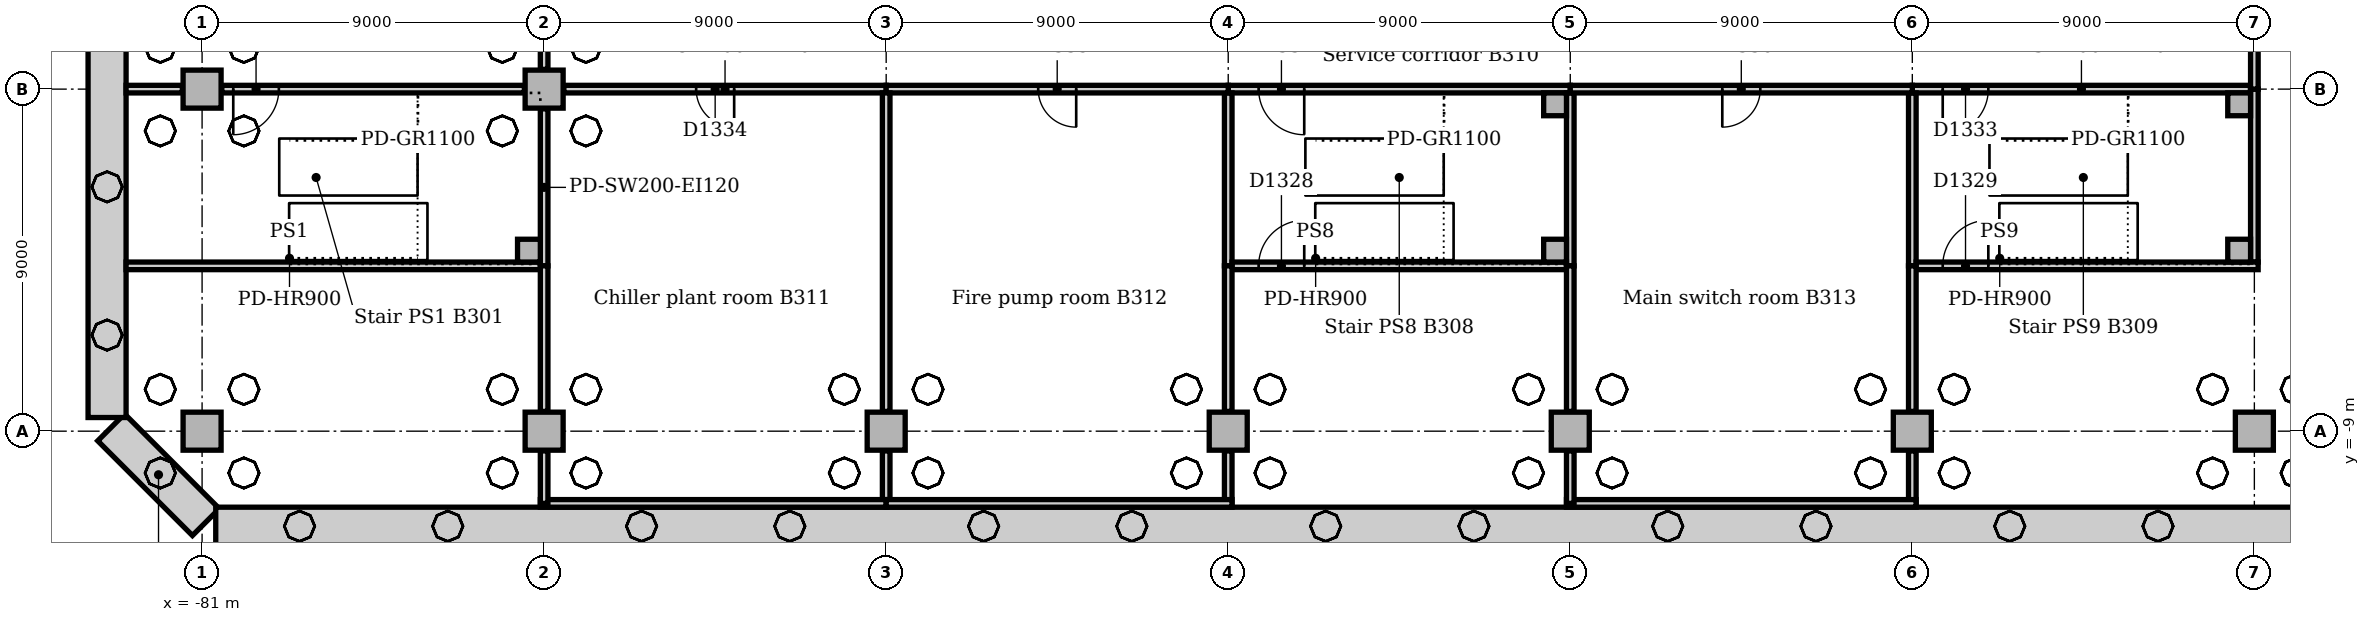
"""IFC4 building model, lengths in metres.
Left out: names, types, materials, properties, quantities, classifications, styles, units other than length and angle.
Written with IfcOpenShell. Run it as: python <this file> out.ifc"""

import sys

from ifc_helpers import new_model, si_unit, direction, frame, frame_2d, origin, origin_2d, place, context, subcontext, project, spatial, rectangle, extrude, element, fill, save


model = new_model("IFC4")
c1 = context("Model", 3, precision=1e-05, world=origin(), true_north=direction((0.0, 1.0)))
c2 = subcontext(c1, "Body", "Model", "MODEL_VIEW")
j1 = project(units=[si_unit("LENGTHUNIT", "METRE"), si_unit("PLANEANGLEUNIT", "RADIAN")], contexts=[c1])
p1 = place(None, origin())
s1 = spatial("IfcSite", under=j1, at=p1, CompositionType="ELEMENT")
p2 = place(p1, origin())
s2 = spatial("IfcBuilding", under=s1, at=p2, CompositionType="ELEMENT")
p3 = place(p2, frame((0.0, 0.0, -14.0)))
s3 = spatial("IfcBuildingStorey", under=s2, at=p3, CompositionType="ELEMENT", Elevation=-14.0)
p4 = place(p3, frame((-80.9, -11.392, 0.0), z_axis=(0.0, 0.0, 1.0), x_axis=(-0.707106781187, 0.707106781187, 0.0)))
e1 = element("IfcWall", 1, at=p4, inside=s3, PredefinedType="SOLIDWALL", context=c2, shape_type="SweptSolid", body=[
    extrude(rectangle(XDim=3.524, YDim=1.0, at=frame_2d((1.762, 0.0))), origin(), (0.0, 0.0, 1.0), 4.5),
])
p5 = place(p3, frame((-83.5, -8.641, 0.0), z_axis=(0.0, 0.0, 1.0), x_axis=(0.0, 1.0, 0.0)))
e2 = element("IfcWall", 2, at=p5, inside=s3, PredefinedType="SOLIDWALL", context=c2, shape_type="SweptSolid", body=[
    extrude(rectangle(XDim=62.282, YDim=1.0, at=frame_2d((31.141, 0.0))), origin(), (0.0, 0.0, 1.0), 4.5),
])
p6 = place(p3, frame((62.641, -11.5, 0.0), z_axis=(0.0, 0.0, 1.0), x_axis=(-1.0, 0.0, 0.0)))
e3 = element("IfcWall", 3, at=p6, inside=s3, PredefinedType="SOLIDWALL", context=c2, shape_type="SweptSolid", body=[
    extrude(rectangle(XDim=143.282, YDim=1.0, at=frame_2d((71.641, 0.0))), origin(), (0.0, 0.0, 1.0), 4.5),
])
for number, where, z_axis, x_axis in (
    (4, (-81.0, -9.0, 0.0), (0.0, 0.0, 1.0), (1.0, 0.0, 0.0)),
    (5, (-81.0, 0.0, 0.0), (0.0, 0.0, 1.0), (1.0, 0.0, 0.0)),
    (6, (-72.0, -9.0, 0.0), (0.0, 0.0, 1.0), (1.0, 0.0, 0.0)),
    (7, (-72.0, 0.0, 0.0), (0.0, 0.0, 1.0), (1.0, 0.0, 0.0)),
    (8, (-63.0, -9.0, 0.0), (0.0, 0.0, 1.0), (1.0, 0.0, 0.0)),
    (9, (-54.0, -9.0, 0.0), (0.0, 0.0, 1.0), (1.0, 0.0, 0.0)),
    (10, (-45.0, -9.0, 0.0), (0.0, 0.0, 1.0), (1.0, 0.0, 0.0)),
    (11, (-36.0, -9.0, 0.0), (0.0, 0.0, 1.0), (1.0, 0.0, 0.0)),
    (12, (-27.0, -9.0, 0.0), (0.0, 0.0, 1.0), (1.0, 0.0, 0.0)),
):
    element("IfcColumn", number, at=place(p3, frame(where, z_axis=z_axis, x_axis=x_axis)), inside=s3, PredefinedType="COLUMN", context=c2, shape_type="SweptSolid", body=[
        extrude(rectangle(XDim=1.0, YDim=1.0, at=origin_2d()), origin(), (0.0, 0.0, 1.0), 4.15),
    ])
for number, where, z_axis, x_axis in (
    (13, (-72.4, -4.25, 0.0), (0.0, 0.0, 1.0), (1.0, 0.0, 0.0)),
    (14, (-45.4, -4.25, 0.0), (0.0, 0.0, 1.0), (1.0, 0.0, 0.0)),
    (15, (-45.4, -0.4, 0.0), (0.0, 0.0, 1.0), (1.0, 0.0, 0.0)),
    (16, (-27.4, -4.25, 0.0), (0.0, 0.0, 1.0), (1.0, 0.0, 0.0)),
    (17, (-27.4, -0.4, 0.0), (0.0, 0.0, 1.0), (1.0, 0.0, 0.0)),
):
    element("IfcColumn", number, at=place(p3, frame(where, z_axis=z_axis, x_axis=x_axis)), inside=s3, PredefinedType="COLUMN", context=c2, shape_type="SweptSolid", body=[
        extrude(rectangle(XDim=0.6, YDim=0.6, at=origin_2d()), origin(), (0.0, 0.0, 1.0), 4.5),
    ])
p7 = place(p3, frame((-72.0, -4.65, 0.0), z_axis=(0.0, 0.0, 1.0), x_axis=(0.0, 1.0, 0.0)))
e18 = element("IfcWall", 18, at=p7, inside=s3, PredefinedType="SOLIDWALL", context=c2, shape_type="SweptSolid", body=[
    extrude(rectangle(XDim=4.13, YDim=0.2, at=frame_2d((2.065, 0.0))), origin(), (0.0, 0.0, 1.0), 4.15),
])
p8 = place(p3, frame((-83.0, -4.65, 0.0), z_axis=(0.0, 0.0, 1.0), x_axis=(1.0, 0.0, 0.0)))
e19 = element("IfcWall", 19, at=p8, inside=s3, PredefinedType="SOLIDWALL", context=c2, shape_type="SweptSolid", body=[
    extrude(rectangle(XDim=10.9, YDim=0.2, at=frame_2d((5.45, 0.0))), origin(), (0.0, 0.0, 1.0), 4.15),
])
p9 = place(p3, frame((-83.0, 0.0, 0.0), z_axis=(0.0, 0.0, 1.0), x_axis=(1.0, 0.0, 0.0)))
e20 = element("IfcWall", 20, at=p9, inside=s3, PredefinedType="SOLIDWALL", context=c2, shape_type="SweptSolid", body=[
    extrude(rectangle(XDim=1.48, YDim=0.2, at=frame_2d((0.74, 0.0))), origin(), (0.0, 0.0, 1.0), 4.15),
])
p10 = place(p3, frame((-80.48, 0.0, 0.0), z_axis=(0.0, 0.0, 1.0), x_axis=(1.0, 0.0, 0.0)))
e21 = element("IfcWall", 21, at=p10, inside=s3, PredefinedType="SOLIDWALL", context=c2, shape_type="SweptSolid", body=[
    extrude(rectangle(XDim=7.96, YDim=0.2, at=frame_2d((3.98, 0.0))), origin(), (0.0, 0.0, 1.0), 4.15),
])
p11 = place(p10, frame((0.3, 0.0, 0.0)))
e22 = element("IfcOpeningElement", 22, at=p11, cuts=e21, PredefinedType="OPENING", context=c2, shape_type="SweptSolid", body=[
    extrude(rectangle(XDim=1.2, YDim=2.1, at=frame_2d((0.6, 1.05))), frame((0.0, 0.11, 0.0), z_axis=(0.0, -1.0, 0.0), x_axis=(1.0, 0.0, 0.0)), (0.0, 0.0, 1.0), 0.22),
])
p12 = place(p3, frame((-54.0, 0.0, 0.0), z_axis=(0.0, 0.0, 1.0), x_axis=(1.0, 0.0, 0.0)))
e23 = element("IfcWall", 23, at=p12, inside=s3, PredefinedType="SOLIDWALL", context=c2, shape_type="SweptSolid", body=[
    extrude(rectangle(XDim=9.0, YDim=0.2, at=frame_2d((4.5, 0.0))), origin(), (0.0, 0.0, 1.0), 4.15),
])
p13 = place(p12, frame((0.8, 0.0, 0.0)))
e24 = element("IfcOpeningElement", 24, at=p13, cuts=e23, PredefinedType="OPENING", context=c2, shape_type="SweptSolid", body=[
    extrude(rectangle(XDim=1.2, YDim=2.1, at=frame_2d((0.6, 1.05))), frame((0.0, 0.11, 0.0), z_axis=(0.0, -1.0, 0.0), x_axis=(1.0, 0.0, 0.0)), (0.0, 0.0, 1.0), 0.22),
])
for number, where, z_axis, x_axis in (
    (25, (-54.0, -4.65, 0.0), (0.0, 0.0, 1.0), (0.0, 1.0, 0.0)),
    (26, (-45.0, -4.65, 0.0), (0.0, 0.0, 1.0), (0.0, 1.0, 0.0)),
):
    element("IfcWall", number, at=place(p3, frame(where, z_axis=z_axis, x_axis=x_axis)), inside=s3, PredefinedType="SOLIDWALL", context=c2, shape_type="SweptSolid", body=[
        extrude(rectangle(XDim=4.55, YDim=0.2, at=frame_2d((2.275, 0.0))), origin(), (0.0, 0.0, 1.0), 4.15),
    ])
p14 = place(p3, frame((-53.9, -4.65, 0.0), z_axis=(0.0, 0.0, 1.0), x_axis=(1.0, 0.0, 0.0)))
e27 = element("IfcWall", 27, at=p14, inside=s3, PredefinedType="SOLIDWALL", context=c2, shape_type="SweptSolid", body=[
    extrude(rectangle(XDim=8.8, YDim=0.2, at=frame_2d((4.4, 0.0))), origin(), (0.0, 0.0, 1.0), 4.15),
])
p15 = place(p14, frame((0.7, 0.0, 0.0)))
e28 = element("IfcOpeningElement", 28, at=p15, cuts=e27, PredefinedType="OPENING", context=c2, shape_type="SweptSolid", body=[
    extrude(rectangle(XDim=1.2, YDim=2.1, at=frame_2d((0.6, 1.05))), frame((0.0, 0.11, 0.0), z_axis=(0.0, -1.0, 0.0), x_axis=(1.0, 0.0, 0.0)), (0.0, 0.0, 1.0), 0.22),
])
p16 = place(p3, frame((-36.0, 0.0, 0.0), z_axis=(0.0, 0.0, 1.0), x_axis=(1.0, 0.0, 0.0)))
e29 = element("IfcWall", 29, at=p16, inside=s3, PredefinedType="SOLIDWALL", context=c2, shape_type="SweptSolid", body=[
    extrude(rectangle(XDim=8.9, YDim=0.2, at=frame_2d((4.45, 0.0))), origin(), (0.0, 0.0, 1.0), 4.15),
])
p17 = place(p16, frame((0.8, 0.0, 0.0)))
e30 = element("IfcOpeningElement", 30, at=p17, cuts=e29, PredefinedType="OPENING", context=c2, shape_type="SweptSolid", body=[
    extrude(rectangle(XDim=1.2, YDim=2.1, at=frame_2d((0.6, 1.05))), frame((0.0, 0.11, 0.0), z_axis=(0.0, -1.0, 0.0), x_axis=(1.0, 0.0, 0.0)), (0.0, 0.0, 1.0), 0.22),
])
for number, where, z_axis, x_axis in (
    (31, (-36.0, -4.65, 0.0), (0.0, 0.0, 1.0), (0.0, 1.0, 0.0)),
    (32, (-27.0, -4.55, 0.0), (0.0, 0.0, 1.0), (0.0, 1.0, 0.0)),
):
    element("IfcWall", number, at=place(p3, frame(where, z_axis=z_axis, x_axis=x_axis)), inside=s3, PredefinedType="SOLIDWALL", context=c2, shape_type="SweptSolid", body=[
        extrude(rectangle(XDim=4.55, YDim=0.2, at=frame_2d((2.275, 0.0))), origin(), (0.0, 0.0, 1.0), 4.15),
    ])
p18 = place(p3, frame((-35.9, -4.65, 0.0), z_axis=(0.0, 0.0, 1.0), x_axis=(1.0, 0.0, 0.0)))
e33 = element("IfcWall", 33, at=p18, inside=s3, PredefinedType="SOLIDWALL", context=c2, shape_type="SweptSolid", body=[
    extrude(rectangle(XDim=9.0, YDim=0.2, at=frame_2d((4.5, 0.0))), origin(), (0.0, 0.0, 1.0), 4.15),
])
p19 = place(p18, frame((0.7, 0.0, 0.0)))
e34 = element("IfcOpeningElement", 34, at=p19, cuts=e33, PredefinedType="OPENING", context=c2, shape_type="SweptSolid", body=[
    extrude(rectangle(XDim=1.2, YDim=2.1, at=frame_2d((0.6, 1.05))), frame((0.0, 0.11, 0.0), z_axis=(0.0, -1.0, 0.0), x_axis=(1.0, 0.0, 0.0)), (0.0, 0.0, 1.0), 0.22),
])
p20 = place(p3, frame((-71.48, 0.0, 0.0), z_axis=(0.0, 0.0, 1.0), x_axis=(1.0, 0.0, 0.0)))
e35 = element("IfcWall", 35, at=p20, inside=s3, PredefinedType="PARTITIONING", context=c2, shape_type="SweptSolid", body=[
    extrude(rectangle(XDim=8.48, YDim=0.2, at=frame_2d((4.24, 0.0))), origin(), (0.0, 0.0, 1.0), 4.15),
])
p21 = place(p20, frame((3.48, 0.0, 0.0)))
e36 = element("IfcOpeningElement", 36, at=p21, cuts=e35, PredefinedType="OPENING", context=c2, shape_type="SweptSolid", body=[
    extrude(rectangle(XDim=1.0, YDim=2.1, at=frame_2d((0.5, 1.05))), frame((0.0, 0.11, 0.0), z_axis=(0.0, -1.0, 0.0), x_axis=(1.0, 0.0, 0.0)), (0.0, 0.0, 1.0), 0.22),
])
p22 = place(p3, frame((-63.0, 0.0, 0.0), z_axis=(0.0, 0.0, 1.0), x_axis=(1.0, 0.0, 0.0)))
e37 = element("IfcWall", 37, at=p22, inside=s3, PredefinedType="PARTITIONING", context=c2, shape_type="SweptSolid", body=[
    extrude(rectangle(XDim=9.0, YDim=0.2, at=frame_2d((4.5, 0.0))), origin(), (0.0, 0.0, 1.0), 4.15),
])
p23 = place(p22, frame((4.0, 0.0, 0.0)))
e38 = element("IfcOpeningElement", 38, at=p23, cuts=e37, PredefinedType="OPENING", context=c2, shape_type="SweptSolid", body=[
    extrude(rectangle(XDim=1.0, YDim=2.1, at=frame_2d((0.5, 1.05))), frame((0.0, 0.11, 0.0), z_axis=(0.0, -1.0, 0.0), x_axis=(1.0, 0.0, 0.0)), (0.0, 0.0, 1.0), 0.22),
])
p24 = place(p3, frame((-45.0, 0.0, 0.0), z_axis=(0.0, 0.0, 1.0), x_axis=(1.0, 0.0, 0.0)))
e39 = element("IfcWall", 39, at=p24, inside=s3, PredefinedType="PARTITIONING", context=c2, shape_type="SweptSolid", body=[
    extrude(rectangle(XDim=9.0, YDim=0.2, at=frame_2d((4.5, 0.0))), origin(), (0.0, 0.0, 1.0), 4.15),
])
p25 = place(p24, frame((4.0, 0.0, 0.0)))
e40 = element("IfcOpeningElement", 40, at=p25, cuts=e39, PredefinedType="OPENING", context=c2, shape_type="SweptSolid", body=[
    extrude(rectangle(XDim=1.0, YDim=2.1, at=frame_2d((0.5, 1.05))), frame((0.0, 0.11, 0.0), z_axis=(0.0, -1.0, 0.0), x_axis=(1.0, 0.0, 0.0)), (0.0, 0.0, 1.0), 0.22),
])
p26 = place(p3, frame((-27.0, 0.0, 0.0), z_axis=(0.0, 0.0, 1.0), x_axis=(0.0, 1.0, 0.0)))
e41 = element("IfcWall", 41, at=p26, inside=s3, PredefinedType="PARTITIONING", context=c2, shape_type="SweptSolid", body=[
    extrude(rectangle(XDim=3.5, YDim=0.2, at=frame_2d((1.75, 0.0))), origin(), (0.0, 0.0, 1.0), 4.15),
])
p27 = place(p3, frame((-72.0, 0.52, 0.0), z_axis=(0.0, 0.0, 1.0), x_axis=(0.0, 1.0, 0.0)))
e42 = element("IfcWall", 42, at=p27, inside=s3, PredefinedType="PARTITIONING", context=c2, shape_type="SweptSolid", body=[
    extrude(rectangle(XDim=3.08, YDim=0.2, at=frame_2d((1.54, 0.0))), origin(), (0.0, 0.0, 1.0), 4.15),
])
p28 = place(p3, frame((-63.0, -10.9, 0.0), z_axis=(0.0, 0.0, 1.0), x_axis=(0.0, 1.0, 0.0)))
e43 = element("IfcWall", 43, at=p28, inside=s3, PredefinedType="PARTITIONING", context=c2, shape_type="SweptSolid", body=[
    extrude(rectangle(XDim=1.38, YDim=0.2, at=frame_2d((0.69, 0.0))), origin(), (0.0, 0.0, 1.0), 4.15),
])
p29 = place(p3, frame((-63.0, -8.48, 0.0), z_axis=(0.0, 0.0, 1.0), x_axis=(0.0, 1.0, 0.0)))
e44 = element("IfcWall", 44, at=p29, inside=s3, PredefinedType="PARTITIONING", context=c2, shape_type="SweptSolid", body=[
    extrude(rectangle(XDim=8.38, YDim=0.2, at=frame_2d((4.19, 0.0))), origin(), (0.0, 0.0, 1.0), 4.15),
])
p30 = place(p3, frame((-72.1, -10.9, 0.0), z_axis=(0.0, 0.0, 1.0), x_axis=(1.0, 0.0, 0.0)))
e45 = element("IfcWall", 45, at=p30, inside=s3, PredefinedType="PARTITIONING", context=c2, shape_type="SweptSolid", body=[
    extrude(rectangle(XDim=9.1, YDim=0.2, at=frame_2d((4.55, 0.0))), origin(), (0.0, 0.0, 1.0), 4.15),
])
p31 = place(p3, frame((-72.0, -10.9, 0.0), z_axis=(0.0, 0.0, 1.0), x_axis=(0.0, 1.0, 0.0)))
e46 = element("IfcWall", 46, at=p31, inside=s3, PredefinedType="PARTITIONING", context=c2, shape_type="SweptSolid", body=[
    extrude(rectangle(XDim=1.38, YDim=0.2, at=frame_2d((0.69, 0.0))), origin(), (0.0, 0.0, 1.0), 4.15),
])
p32 = place(p3, frame((-72.0, -8.48, 0.0), z_axis=(0.0, 0.0, 1.0), x_axis=(0.0, 1.0, 0.0)))
e47 = element("IfcWall", 47, at=p32, inside=s3, PredefinedType="PARTITIONING", context=c2, shape_type="SweptSolid", body=[
    extrude(rectangle(XDim=3.83, YDim=0.2, at=frame_2d((1.915, 0.0))), origin(), (0.0, 0.0, 1.0), 4.15),
])
p33 = place(p3, frame((-54.0, -10.9, 0.0), z_axis=(0.0, 0.0, 1.0), x_axis=(0.0, 1.0, 0.0)))
e48 = element("IfcWall", 48, at=p33, inside=s3, PredefinedType="PARTITIONING", context=c2, shape_type="SweptSolid", body=[
    extrude(rectangle(XDim=1.38, YDim=0.2, at=frame_2d((0.69, 0.0))), origin(), (0.0, 0.0, 1.0), 4.15),
])
p34 = place(p3, frame((-54.0, -8.48, 0.0), z_axis=(0.0, 0.0, 1.0), x_axis=(0.0, 1.0, 0.0)))
e49 = element("IfcWall", 49, at=p34, inside=s3, PredefinedType="PARTITIONING", context=c2, shape_type="SweptSolid", body=[
    extrude(rectangle(XDim=3.83, YDim=0.2, at=frame_2d((1.915, 0.0))), origin(), (0.0, 0.0, 1.0), 4.15),
])
p35 = place(p3, frame((-63.0, -10.9, 0.0), z_axis=(0.0, 0.0, 1.0), x_axis=(1.0, 0.0, 0.0)))
e50 = element("IfcWall", 50, at=p35, inside=s3, PredefinedType="PARTITIONING", context=c2, shape_type="SweptSolid", body=[
    extrude(rectangle(XDim=9.1, YDim=0.2, at=frame_2d((4.55, 0.0))), origin(), (0.0, 0.0, 1.0), 4.15),
])
p36 = place(p3, frame((-36.0, -10.9, 0.0), z_axis=(0.0, 0.0, 1.0), x_axis=(0.0, 1.0, 0.0)))
e51 = element("IfcWall", 51, at=p36, inside=s3, PredefinedType="PARTITIONING", context=c2, shape_type="SweptSolid", body=[
    extrude(rectangle(XDim=1.38, YDim=0.2, at=frame_2d((0.69, 0.0))), origin(), (0.0, 0.0, 1.0), 4.15),
])
p37 = place(p3, frame((-36.0, -8.48, 0.0), z_axis=(0.0, 0.0, 1.0), x_axis=(0.0, 1.0, 0.0)))
e52 = element("IfcWall", 52, at=p37, inside=s3, PredefinedType="PARTITIONING", context=c2, shape_type="SweptSolid", body=[
    extrude(rectangle(XDim=3.83, YDim=0.2, at=frame_2d((1.915, 0.0))), origin(), (0.0, 0.0, 1.0), 4.15),
])
p38 = place(p3, frame((-45.1, -10.9, 0.0), z_axis=(0.0, 0.0, 1.0), x_axis=(1.0, 0.0, 0.0)))
e53 = element("IfcWall", 53, at=p38, inside=s3, PredefinedType="PARTITIONING", context=c2, shape_type="SweptSolid", body=[
    extrude(rectangle(XDim=9.2, YDim=0.2, at=frame_2d((4.6, 0.0))), origin(), (0.0, 0.0, 1.0), 4.15),
])
p39 = place(p3, frame((-45.0, -10.9, 0.0), z_axis=(0.0, 0.0, 1.0), x_axis=(0.0, 1.0, 0.0)))
e54 = element("IfcWall", 54, at=p39, inside=s3, PredefinedType="PARTITIONING", context=c2, shape_type="SweptSolid", body=[
    extrude(rectangle(XDim=1.38, YDim=0.2, at=frame_2d((0.69, 0.0))), origin(), (0.0, 0.0, 1.0), 4.15),
])
p40 = place(p3, frame((-45.0, -8.48, 0.0), z_axis=(0.0, 0.0, 1.0), x_axis=(0.0, 1.0, 0.0)))
e55 = element("IfcWall", 55, at=p40, inside=s3, PredefinedType="PARTITIONING", context=c2, shape_type="SweptSolid", body=[
    extrude(rectangle(XDim=3.83, YDim=0.2, at=frame_2d((1.915, 0.0))), origin(), (0.0, 0.0, 1.0), 4.15),
])
p41 = place(p11, frame((1.2, 0.0, 0.0), z_axis=(0.0, 0.0, 1.0), x_axis=(-1.0, 0.0, 0.0)))
e56 = element("IfcDoor", 56, at=p41, inside=s3, OperationType="SINGLE_SWING_RIGHT", PredefinedType="DOOR", context=c2, shape_type="SweptSolid", body=[
    extrude(rectangle(XDim=1.2, YDim=2.1, at=frame_2d((0.6, 1.05))), frame((0.0, 0.025, 0.0), z_axis=(0.0, -1.0, 0.0), x_axis=(1.0, 0.0, 0.0)), (0.0, 0.0, 1.0), 0.05),
])
fill(e22, e56)
p42 = place(p15, origin())
e57 = element("IfcDoor", 57, at=p42, inside=s3, OperationType="SINGLE_SWING_RIGHT", PredefinedType="DOOR", context=c2, shape_type="SweptSolid", body=[
    extrude(rectangle(XDim=1.2, YDim=2.1, at=frame_2d((0.6, 1.05))), frame((0.0, 0.025, 0.0), z_axis=(0.0, -1.0, 0.0), x_axis=(1.0, 0.0, 0.0)), (0.0, 0.0, 1.0), 0.05),
])
fill(e28, e57)
p43 = place(p19, origin())
e58 = element("IfcDoor", 58, at=p43, inside=s3, OperationType="SINGLE_SWING_RIGHT", PredefinedType="DOOR", context=c2, shape_type="SweptSolid", body=[
    extrude(rectangle(XDim=1.2, YDim=2.1, at=frame_2d((0.6, 1.05))), frame((0.0, 0.025, 0.0), z_axis=(0.0, -1.0, 0.0), x_axis=(1.0, 0.0, 0.0)), (0.0, 0.0, 1.0), 0.05),
])
fill(e34, e58)
p44 = place(p13, frame((1.2, 0.0, 0.0), z_axis=(0.0, 0.0, 1.0), x_axis=(-1.0, 0.0, 0.0)))
e59 = element("IfcDoor", 59, at=p44, inside=s3, OperationType="SINGLE_SWING_LEFT", PredefinedType="DOOR", context=c2, shape_type="SweptSolid", body=[
    extrude(rectangle(XDim=1.2, YDim=2.1, at=frame_2d((0.6, 1.05))), frame((0.0, 0.025, 0.0), z_axis=(0.0, -1.0, 0.0), x_axis=(1.0, 0.0, 0.0)), (0.0, 0.0, 1.0), 0.05),
])
fill(e24, e59)
p45 = place(p17, frame((1.2, 0.0, 0.0), z_axis=(0.0, 0.0, 1.0), x_axis=(-1.0, 0.0, 0.0)))
e60 = element("IfcDoor", 60, at=p45, inside=s3, OperationType="SINGLE_SWING_RIGHT", PredefinedType="DOOR", context=c2, shape_type="SweptSolid", body=[
    extrude(rectangle(XDim=1.2, YDim=2.1, at=frame_2d((0.6, 1.05))), frame((0.0, 0.025, 0.0), z_axis=(0.0, -1.0, 0.0), x_axis=(1.0, 0.0, 0.0)), (0.0, 0.0, 1.0), 0.05),
])
fill(e30, e60)
p46 = place(p21, frame((1.0, 0.0, 0.0), z_axis=(0.0, 0.0, 1.0), x_axis=(-1.0, 0.0, 0.0)))
e61 = element("IfcDoor", 61, at=p46, inside=s3, OperationType="SINGLE_SWING_LEFT", PredefinedType="DOOR", context=c2, shape_type="SweptSolid", body=[
    extrude(rectangle(XDim=1.0, YDim=2.1, at=frame_2d((0.5, 1.05))), frame((0.0, 0.025, 0.0), z_axis=(0.0, -1.0, 0.0), x_axis=(1.0, 0.0, 0.0)), (0.0, 0.0, 1.0), 0.05),
])
fill(e36, e61)
p47 = place(p23, frame((1.0, 0.0, 0.0), z_axis=(0.0, 0.0, 1.0), x_axis=(-1.0, 0.0, 0.0)))
e62 = element("IfcDoor", 62, at=p47, inside=s3, OperationType="SINGLE_SWING_LEFT", PredefinedType="DOOR", context=c2, shape_type="SweptSolid", body=[
    extrude(rectangle(XDim=1.0, YDim=2.1, at=frame_2d((0.5, 1.05))), frame((0.0, 0.025, 0.0), z_axis=(0.0, -1.0, 0.0), x_axis=(1.0, 0.0, 0.0)), (0.0, 0.0, 1.0), 0.05),
])
fill(e38, e62)
p48 = place(p25, frame((1.0, 0.0, 0.0), z_axis=(0.0, 0.0, 1.0), x_axis=(-1.0, 0.0, 0.0)))
e63 = element("IfcDoor", 63, at=p48, inside=s3, OperationType="SINGLE_SWING_RIGHT", PredefinedType="DOOR", context=c2, shape_type="SweptSolid", body=[
    extrude(rectangle(XDim=1.0, YDim=2.1, at=frame_2d((0.5, 1.05))), frame((0.0, 0.025, 0.0), z_axis=(0.0, -1.0, 0.0), x_axis=(1.0, 0.0, 0.0)), (0.0, 0.0, 1.0), 0.05),
])
fill(e40, e63)
save(model, sys.argv[1])
